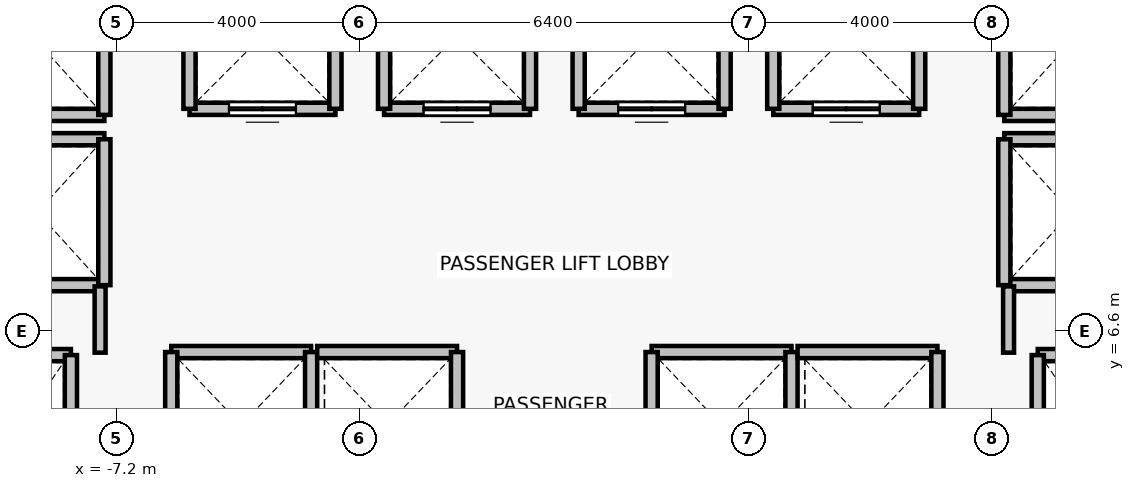
"""IFC4 building model, lengths in metres.
Left out: names, types, materials, properties, quantities, classifications, styles, units other than length and angle.
Written with IfcOpenShell. Run it as: python <this file> out.ifc"""

import sys

from ifc_helpers import new_model, si_unit, direction, frame, frame_2d, origin, place, context, subcontext, project, spatial, rectangle, extrude, source, transform, mapped, element, fill, save


model = new_model("IFC4")
c1 = context("Model", 3, precision=1e-05, world=origin(), true_north=direction((0.0, 1.0)))
c2 = subcontext(c1, "Body", "Model", "MODEL_VIEW")
j1 = project(units=[si_unit("LENGTHUNIT", "METRE"), si_unit("PLANEANGLEUNIT", "RADIAN")], contexts=[c1])
p1 = place(None, origin())
s1 = spatial("IfcSite", under=j1, at=p1, CompositionType="ELEMENT")
p2 = place(p1, origin())
s2 = spatial("IfcBuilding", under=s1, at=p2, CompositionType="ELEMENT")
p3 = place(p2, frame((0.0, 0.0, 73.6)))
s3 = spatial("IfcBuildingStorey", under=s2, at=p3, CompositionType="ELEMENT", Elevation=73.6)
p4 = place(p3, frame((-9.95, 6.2, 0.0), z_axis=(0.0, 0.0, 1.0), x_axis=(1.0, 0.0, 0.0)))
e1 = element("IfcWall", 1, at=p4, inside=s3, PredefinedType="SOLIDWALL", context=c2, shape_type="SweptSolid", body=[
    extrude(rectangle(XDim=2.0, YDim=0.2, at=frame_2d((1.0, 0.0))), origin(), (0.0, 0.0, 1.0), 3.075),
])
p5 = place(p3, frame((-7.95, 6.2, 0.0), z_axis=(0.0, 0.0, 1.0), x_axis=(0.0, -1.0, 0.0)))
e2 = element("IfcWall", 2, at=p5, inside=s3, PredefinedType="SOLIDWALL", context=c2, shape_type="SweptSolid", body=[
    extrude(rectangle(XDim=2.8, YDim=0.2, at=frame_2d((1.4, 0.0))), origin(), (0.0, 0.0, 1.0), 3.075),
])
p6 = place(p3, frame((7.95, 6.2, 0.0), z_axis=(0.0, 0.0, 1.0), x_axis=(1.0, 0.0, 0.0)))
e3 = element("IfcWall", 3, at=p6, inside=s3, PredefinedType="SOLIDWALL", context=c2, shape_type="SweptSolid", body=[
    extrude(rectangle(XDim=2.0, YDim=0.2, at=frame_2d((1.0, 0.0))), origin(), (0.0, 0.0, 1.0), 3.075),
])
p7 = place(p3, frame((7.95, 3.4, 0.0), z_axis=(0.0, 0.0, 1.0), x_axis=(0.0, 1.0, 0.0)))
e4 = element("IfcWall", 4, at=p7, inside=s3, PredefinedType="SOLIDWALL", context=c2, shape_type="SweptSolid", body=[
    extrude(rectangle(XDim=2.8, YDim=0.2, at=frame_2d((1.4, 0.0))), origin(), (0.0, 0.0, 1.0), 3.075),
])
p8 = place(p3, frame((-3.6, 10.25, 0.0), z_axis=(0.0, 0.0, 1.0), x_axis=(-1.0, 0.0, 0.0)))
e5 = element("IfcWall", 5, at=p8, inside=s3, PredefinedType="SOLIDWALL", context=c2, shape_type="SweptSolid", body=[
    extrude(rectangle(XDim=2.4, YDim=0.2, at=frame_2d((1.2, 0.0))), origin(), (0.0, 0.0, 1.0), 3.075),
])
p9 = place(p8, frame((0.65, 0.0, 0.0)))
e6 = element("IfcOpeningElement", 6, at=p9, cuts=e5, PredefinedType="OPENING", context=c2, shape_type="SweptSolid", body=[
    extrude(rectangle(XDim=1.1, YDim=2.2, at=frame_2d((0.55, 1.1))), frame((0.0, 0.11, 0.0), z_axis=(0.0, -1.0, 0.0), x_axis=(1.0, 0.0, 0.0)), (0.0, 0.0, 1.0), 0.22),
])
for number, where, z_axis, x_axis in (
    (7, (-6.0, 10.25, 0.0), (0.0, 0.0, 1.0), (0.0, 1.0, 0.0)),
    (8, (-3.6, 12.65, 0.0), (0.0, 0.0, 1.0), (0.0, -1.0, 0.0)),
):
    element("IfcWall", number, at=place(p3, frame(where, z_axis=z_axis, x_axis=x_axis)), inside=s3, PredefinedType="SOLIDWALL", context=c2, shape_type="SweptSolid", body=[
        extrude(rectangle(XDim=2.4, YDim=0.2, at=frame_2d((1.2, 0.0))), origin(), (0.0, 0.0, 1.0), 3.075),
    ])
p10 = place(p3, frame((-0.4, 10.25, 0.0), z_axis=(0.0, 0.0, 1.0), x_axis=(-1.0, 0.0, 0.0)))
e9 = element("IfcWall", 9, at=p10, inside=s3, PredefinedType="SOLIDWALL", context=c2, shape_type="SweptSolid", body=[
    extrude(rectangle(XDim=2.4, YDim=0.2, at=frame_2d((1.2, 0.0))), origin(), (0.0, 0.0, 1.0), 3.075),
])
p11 = place(p10, frame((0.65, 0.0, 0.0)))
e10 = element("IfcOpeningElement", 10, at=p11, cuts=e9, PredefinedType="OPENING", context=c2, shape_type="SweptSolid", body=[
    extrude(rectangle(XDim=1.1, YDim=2.2, at=frame_2d((0.55, 1.1))), frame((0.0, 0.11, 0.0), z_axis=(0.0, -1.0, 0.0), x_axis=(1.0, 0.0, 0.0)), (0.0, 0.0, 1.0), 0.22),
])
for number, where, z_axis, x_axis in (
    (11, (-2.8, 10.25, 0.0), (0.0, 0.0, 1.0), (0.0, 1.0, 0.0)),
    (12, (-0.4, 12.65, 0.0), (0.0, 0.0, 1.0), (0.0, -1.0, 0.0)),
):
    element("IfcWall", number, at=place(p3, frame(where, z_axis=z_axis, x_axis=x_axis)), inside=s3, PredefinedType="SOLIDWALL", context=c2, shape_type="SweptSolid", body=[
        extrude(rectangle(XDim=2.4, YDim=0.2, at=frame_2d((1.2, 0.0))), origin(), (0.0, 0.0, 1.0), 3.075),
    ])
p12 = place(p3, frame((2.8, 10.25, 0.0), z_axis=(0.0, 0.0, 1.0), x_axis=(-1.0, 0.0, 0.0)))
e13 = element("IfcWall", 13, at=p12, inside=s3, PredefinedType="SOLIDWALL", context=c2, shape_type="SweptSolid", body=[
    extrude(rectangle(XDim=2.4, YDim=0.2, at=frame_2d((1.2, 0.0))), origin(), (0.0, 0.0, 1.0), 3.075),
])
p13 = place(p12, frame((0.65, 0.0, 0.0)))
e14 = element("IfcOpeningElement", 14, at=p13, cuts=e13, PredefinedType="OPENING", context=c2, shape_type="SweptSolid", body=[
    extrude(rectangle(XDim=1.1, YDim=2.2, at=frame_2d((0.55, 1.1))), frame((0.0, 0.11, 0.0), z_axis=(0.0, -1.0, 0.0), x_axis=(1.0, 0.0, 0.0)), (0.0, 0.0, 1.0), 0.22),
])
for number, where, z_axis, x_axis in (
    (15, (0.4, 10.25, 0.0), (0.0, 0.0, 1.0), (0.0, 1.0, 0.0)),
    (16, (2.8, 12.65, 0.0), (0.0, 0.0, 1.0), (0.0, -1.0, 0.0)),
):
    element("IfcWall", number, at=place(p3, frame(where, z_axis=z_axis, x_axis=x_axis)), inside=s3, PredefinedType="SOLIDWALL", context=c2, shape_type="SweptSolid", body=[
        extrude(rectangle(XDim=2.4, YDim=0.2, at=frame_2d((1.2, 0.0))), origin(), (0.0, 0.0, 1.0), 3.075),
    ])
p14 = place(p3, frame((6.0, 10.25, 0.0), z_axis=(0.0, 0.0, 1.0), x_axis=(-1.0, 0.0, 0.0)))
e17 = element("IfcWall", 17, at=p14, inside=s3, PredefinedType="SOLIDWALL", context=c2, shape_type="SweptSolid", body=[
    extrude(rectangle(XDim=2.4, YDim=0.2, at=frame_2d((1.2, 0.0))), origin(), (0.0, 0.0, 1.0), 3.075),
])
p15 = place(p14, frame((0.65, 0.0, 0.0)))
e18 = element("IfcOpeningElement", 18, at=p15, cuts=e17, PredefinedType="OPENING", context=c2, shape_type="SweptSolid", body=[
    extrude(rectangle(XDim=1.1, YDim=2.2, at=frame_2d((0.55, 1.1))), frame((0.0, 0.11, 0.0), z_axis=(0.0, -1.0, 0.0), x_axis=(1.0, 0.0, 0.0)), (0.0, 0.0, 1.0), 0.22),
])
for number, where, z_axis, x_axis in (
    (19, (3.6, 10.25, 0.0), (0.0, 0.0, 1.0), (0.0, 1.0, 0.0)),
    (20, (6.0, 12.65, 0.0), (0.0, 0.0, 1.0), (0.0, -1.0, 0.0)),
):
    element("IfcWall", number, at=place(p3, frame(where, z_axis=z_axis, x_axis=x_axis)), inside=s3, PredefinedType="SOLIDWALL", context=c2, shape_type="SweptSolid", body=[
        extrude(rectangle(XDim=2.4, YDim=0.2, at=frame_2d((1.2, 0.0))), origin(), (0.0, 0.0, 1.0), 3.075),
    ])
p16 = place(p3, frame((-6.3, 6.25, 0.0), z_axis=(0.0, 0.0, 1.0), x_axis=(1.0, 0.0, 0.0)))
e21 = element("IfcWall", 21, at=p16, inside=s3, PredefinedType="SOLIDWALL", context=c2, shape_type="SweptSolid", body=[
    extrude(rectangle(XDim=2.3, YDim=0.2, at=frame_2d((1.15, 0.0))), origin(), (0.0, 0.0, 1.0), 3.075),
])
for number, where, z_axis, x_axis in (
    (22, (-6.3, 3.85, 0.0), (0.0, 0.0, 1.0), (0.0, 1.0, 0.0)),
    (23, (-4.0, 6.25, 0.0), (0.0, 0.0, 1.0), (0.0, -1.0, 0.0)),
):
    element("IfcWall", number, at=place(p3, frame(where, z_axis=z_axis, x_axis=x_axis)), inside=s3, PredefinedType="SOLIDWALL", context=c2, shape_type="SweptSolid", body=[
        extrude(rectangle(XDim=2.4, YDim=0.2, at=frame_2d((1.2, 0.0))), origin(), (0.0, 0.0, 1.0), 3.075),
    ])
p17 = place(p3, frame((-3.9, 6.25, 0.0), z_axis=(0.0, 0.0, 1.0), x_axis=(1.0, 0.0, 0.0)))
e24 = element("IfcWall", 24, at=p17, inside=s3, PredefinedType="SOLIDWALL", context=c2, shape_type="SweptSolid", body=[
    extrude(rectangle(XDim=2.3, YDim=0.2, at=frame_2d((1.15, 0.0))), origin(), (0.0, 0.0, 1.0), 3.075),
])
p18 = place(p3, frame((-1.6, 6.25, 0.0), z_axis=(0.0, 0.0, 1.0), x_axis=(0.0, -1.0, 0.0)))
e25 = element("IfcWall", 25, at=p18, inside=s3, PredefinedType="SOLIDWALL", context=c2, shape_type="SweptSolid", body=[
    extrude(rectangle(XDim=2.4, YDim=0.2, at=frame_2d((1.2, 0.0))), origin(), (0.0, 0.0, 1.0), 3.075),
])
p19 = place(p3, frame((1.6, 6.25, 0.0), z_axis=(0.0, 0.0, 1.0), x_axis=(1.0, 0.0, 0.0)))
e26 = element("IfcWall", 26, at=p19, inside=s3, PredefinedType="SOLIDWALL", context=c2, shape_type="SweptSolid", body=[
    extrude(rectangle(XDim=2.3, YDim=0.2, at=frame_2d((1.15, 0.0))), origin(), (0.0, 0.0, 1.0), 3.075),
])
for number, where, z_axis, x_axis in (
    (27, (1.6, 3.85, 0.0), (0.0, 0.0, 1.0), (0.0, 1.0, 0.0)),
    (28, (3.9, 6.25, 0.0), (0.0, 0.0, 1.0), (0.0, -1.0, 0.0)),
):
    element("IfcWall", number, at=place(p3, frame(where, z_axis=z_axis, x_axis=x_axis)), inside=s3, PredefinedType="SOLIDWALL", context=c2, shape_type="SweptSolid", body=[
        extrude(rectangle(XDim=2.4, YDim=0.2, at=frame_2d((1.2, 0.0))), origin(), (0.0, 0.0, 1.0), 3.075),
    ])
p20 = place(p3, frame((4.0, 6.25, 0.0), z_axis=(0.0, 0.0, 1.0), x_axis=(1.0, 0.0, 0.0)))
e29 = element("IfcWall", 29, at=p20, inside=s3, PredefinedType="SOLIDWALL", context=c2, shape_type="SweptSolid", body=[
    extrude(rectangle(XDim=2.3, YDim=0.2, at=frame_2d((1.15, 0.0))), origin(), (0.0, 0.0, 1.0), 3.075),
])
p21 = place(p3, frame((6.3, 6.25, 0.0), z_axis=(0.0, 0.0, 1.0), x_axis=(0.0, -1.0, 0.0)))
e30 = element("IfcWall", 30, at=p21, inside=s3, PredefinedType="SOLIDWALL", context=c2, shape_type="SweptSolid", body=[
    extrude(rectangle(XDim=2.4, YDim=0.2, at=frame_2d((1.2, 0.0))), origin(), (0.0, 0.0, 1.0), 3.075),
])
for number, where, z_axis, x_axis in (
    (31, (-7.4, 7.35, 0.0), (0.0, 0.0, 1.0), (-1.0, 0.0, 0.0)),
    (32, (-9.6, 9.75, 0.0), (0.0, 0.0, 1.0), (1.0, 0.0, 0.0)),
):
    element("IfcWall", number, at=place(p3, frame(where, z_axis=z_axis, x_axis=x_axis)), inside=s3, PredefinedType="SOLIDWALL", context=c2, shape_type="SweptSolid", body=[
        extrude(rectangle(XDim=2.2, YDim=0.2, at=frame_2d((1.1, 0.0))), origin(), (0.0, 0.0, 1.0), 2.465),
    ])
p22 = place(p3, frame((-7.4, 9.75, 0.0), z_axis=(0.0, 0.0, 1.0), x_axis=(0.0, -1.0, 0.0)))
e33 = element("IfcWall", 33, at=p22, inside=s3, PredefinedType="SOLIDWALL", context=c2, shape_type="SweptSolid", body=[
    extrude(rectangle(XDim=2.4, YDim=0.2, at=frame_2d((1.2, 0.0))), origin(), (0.0, 0.0, 1.0), 2.465),
])
p23 = place(p3, frame((-7.4, 10.15, 0.0), z_axis=(0.0, 0.0, 1.0), x_axis=(-1.0, 0.0, 0.0)))
e34 = element("IfcWall", 34, at=p23, inside=s3, PredefinedType="SOLIDWALL", context=c2, shape_type="SweptSolid", body=[
    extrude(rectangle(XDim=2.2, YDim=0.2, at=frame_2d((1.1, 0.0))), origin(), (0.0, 0.0, 1.0), 2.465),
])
p24 = place(p3, frame((-7.4, 12.55, 0.0), z_axis=(0.0, 0.0, 1.0), x_axis=(0.0, -1.0, 0.0)))
e35 = element("IfcWall", 35, at=p24, inside=s3, PredefinedType="SOLIDWALL", context=c2, shape_type="SweptSolid", body=[
    extrude(rectangle(XDim=2.4, YDim=0.2, at=frame_2d((1.2, 0.0))), origin(), (0.0, 0.0, 1.0), 2.465),
])
for number, where, z_axis, x_axis in (
    (36, (9.6, 7.35, 0.0), (0.0, 0.0, 1.0), (-1.0, 0.0, 0.0)),
    (37, (7.4, 9.75, 0.0), (0.0, 0.0, 1.0), (1.0, 0.0, 0.0)),
):
    element("IfcWall", number, at=place(p3, frame(where, z_axis=z_axis, x_axis=x_axis)), inside=s3, PredefinedType="SOLIDWALL", context=c2, shape_type="SweptSolid", body=[
        extrude(rectangle(XDim=2.2, YDim=0.2, at=frame_2d((1.1, 0.0))), origin(), (0.0, 0.0, 1.0), 2.465),
    ])
p25 = place(p3, frame((7.4, 7.35, 0.0), z_axis=(0.0, 0.0, 1.0), x_axis=(0.0, 1.0, 0.0)))
e38 = element("IfcWall", 38, at=p25, inside=s3, PredefinedType="SOLIDWALL", context=c2, shape_type="SweptSolid", body=[
    extrude(rectangle(XDim=2.4, YDim=0.2, at=frame_2d((1.2, 0.0))), origin(), (0.0, 0.0, 1.0), 2.465),
])
p26 = place(p3, frame((9.6, 10.15, 0.0), z_axis=(0.0, 0.0, 1.0), x_axis=(-1.0, 0.0, 0.0)))
e39 = element("IfcWall", 39, at=p26, inside=s3, PredefinedType="SOLIDWALL", context=c2, shape_type="SweptSolid", body=[
    extrude(rectangle(XDim=2.2, YDim=0.2, at=frame_2d((1.1, 0.0))), origin(), (0.0, 0.0, 1.0), 2.465),
])
p27 = place(p3, frame((7.4, 10.15, 0.0), z_axis=(0.0, 0.0, 1.0), x_axis=(0.0, 1.0, 0.0)))
e40 = element("IfcWall", 40, at=p27, inside=s3, PredefinedType="SOLIDWALL", context=c2, shape_type="SweptSolid", body=[
    extrude(rectangle(XDim=2.4, YDim=0.2, at=frame_2d((1.2, 0.0))), origin(), (0.0, 0.0, 1.0), 2.465),
])
for number, where, z_axis, x_axis in (
    (41, (-7.47, 7.33, 0.0), (0.0, 0.0, 1.0), (0.0, -1.0, 0.0)),
    (42, (7.47, 6.24, 0.0), (0.0, 0.0, 1.0), (0.0, 1.0, 0.0)),
):
    element("IfcWall", number, at=place(p3, frame(where, z_axis=z_axis, x_axis=x_axis)), inside=s3, PredefinedType="PARTITIONING", context=c2, shape_type="SweptSolid", body=[
        extrude(rectangle(XDim=1.09, YDim=0.18, at=frame_2d((0.545, 0.0))), origin(), (0.0, 0.0, 1.0), 2.465),
    ])
m1 = source(origin(), c2, "Body", "SweptSolid", [
    extrude(rectangle(XDim=1.1, YDim=2.2, at=frame_2d((0.55, 1.1))), frame((0.0, 0.025, 0.0), z_axis=(0.0, -1.0, 0.0), x_axis=(1.0, 0.0, 0.0)), (0.0, 0.0, 1.0), 0.05),
])
p28 = place(p9, origin())
e43 = element("IfcDoor", 43, at=p28, inside=s3, OperationType="DOUBLE_DOOR_SLIDING", PredefinedType="DOOR", context=c2, shape_type="MappedRepresentation", body=[
    mapped(m1, transform((0.0, 0.0, 0.0), x_axis=(1.0, 0.0, 0.0), y_axis=(0.0, 1.0, 0.0), z_axis=(0.0, 0.0, 1.0), scale=1.0)),
])
fill(e6, e43)
p29 = place(p11, origin())
e44 = element("IfcDoor", 44, at=p29, inside=s3, OperationType="DOUBLE_DOOR_SLIDING", PredefinedType="DOOR", context=c2, shape_type="MappedRepresentation", body=[
    mapped(m1, transform((0.0, 0.0, 0.0), x_axis=(1.0, 0.0, 0.0), y_axis=(0.0, 1.0, 0.0), z_axis=(0.0, 0.0, 1.0), scale=1.0)),
])
fill(e10, e44)
p30 = place(p13, origin())
e45 = element("IfcDoor", 45, at=p30, inside=s3, OperationType="DOUBLE_DOOR_SLIDING", PredefinedType="DOOR", context=c2, shape_type="MappedRepresentation", body=[
    mapped(m1, transform((0.0, 0.0, 0.0), x_axis=(1.0, 0.0, 0.0), y_axis=(0.0, 1.0, 0.0), z_axis=(0.0, 0.0, 1.0), scale=1.0)),
])
fill(e14, e45)
p31 = place(p15, origin())
e46 = element("IfcDoor", 46, at=p31, inside=s3, OperationType="DOUBLE_DOOR_SLIDING", PredefinedType="DOOR", context=c2, shape_type="MappedRepresentation", body=[
    mapped(m1, transform((0.0, 0.0, 0.0), x_axis=(1.0, 0.0, 0.0), y_axis=(0.0, 1.0, 0.0), z_axis=(0.0, 0.0, 1.0), scale=1.0)),
])
fill(e18, e46)
save(model, sys.argv[1])
